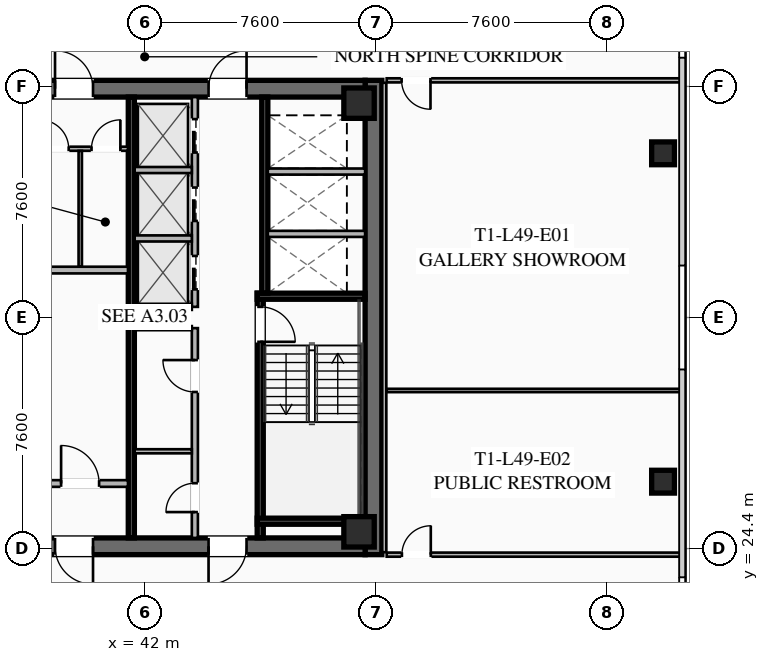
"""IFC4 building model, lengths in metres.
Left out: names, types, materials, properties, quantities, classifications, styles, units other than length and angle.
Written with IfcOpenShell. Run it as: python <this file> out.ifc"""

import sys

from ifc_helpers import new_model, si_unit, direction, frame, frame_2d, origin, origin_2d, place, context, subcontext, project, spatial, rectangle, hollow_rectangle, extrude, element, fill, save


model = new_model("IFC4")
c1 = context("Model", 3, precision=1e-05, world=origin(), true_north=direction((0.0, 1.0)))
c2 = subcontext(c1, "Body", "Model", "MODEL_VIEW")
j1 = project(units=[si_unit("LENGTHUNIT", "METRE"), si_unit("PLANEANGLEUNIT", "RADIAN")], contexts=[c1])
p1 = place(None, origin())
s1 = spatial("IfcSite", under=j1, at=p1, CompositionType="ELEMENT")
p2 = place(p1, origin())
s2 = spatial("IfcBuilding", under=s1, at=p2, CompositionType="ELEMENT")
p3 = place(p2, frame((0.0, 0.0, 181.85)))
s3 = spatial("IfcBuildingStorey", under=s2, at=p3, CompositionType="ELEMENT", Elevation=181.85)
p4 = place(p3, frame((49.525, 39.8, 0.0), z_axis=(0.0, 0.0, 1.0), x_axis=(0.0, -1.0, 0.0)))
e1 = element("IfcWall", 1, at=p4, inside=s3, PredefinedType="SHEAR", context=c2, shape_type="SweptSolid", body=[
    extrude(rectangle(XDim=15.6, YDim=0.55, at=frame_2d((7.8, 0.0))), origin(), (0.0, 0.0, 1.0), 3.55),
])
p5 = place(p3, frame((49.25, 24.475, 0.0), z_axis=(0.0, 0.0, 1.0), x_axis=(-1.0, 0.0, 0.0)))
e2 = element("IfcWall", 2, at=p5, inside=s3, PredefinedType="SHEAR", context=c2, shape_type="SweptSolid", body=[
    extrude(rectangle(XDim=14.5, YDim=0.55, at=frame_2d((7.25, 0.0))), origin(), (0.0, 0.0, 1.0), 3.55),
])
p6 = place(p5, frame((8.95, 0.0, 0.0)))
e3 = element("IfcOpeningElement", 3, at=p6, cuts=e2, PredefinedType="OPENING", context=c2, shape_type="SweptSolid", body=[
    extrude(rectangle(XDim=1.25, YDim=2.25, at=frame_2d((0.625, 1.125))), frame((0.0, 0.285, 0.0), z_axis=(0.0, -1.0, 0.0), x_axis=(1.0, 0.0, 0.0)), (0.0, 0.0, 1.0), 0.57),
])
p7 = place(p5, frame((3.9, 0.0, 0.0)))
e4 = element("IfcOpeningElement", 4, at=p7, cuts=e2, PredefinedType="OPENING", context=c2, shape_type="SweptSolid", body=[
    extrude(rectangle(XDim=1.25, YDim=2.25, at=frame_2d((0.625, 1.125))), frame((0.0, 0.285, 0.0), z_axis=(0.0, -1.0, 0.0), x_axis=(1.0, 0.0, 0.0)), (0.0, 0.0, 1.0), 0.57),
])
p8 = place(p3, frame((34.75, 39.525, 0.0), z_axis=(0.0, 0.0, 1.0), x_axis=(1.0, 0.0, 0.0)))
e5 = element("IfcWall", 5, at=p8, inside=s3, PredefinedType="SHEAR", context=c2, shape_type="SweptSolid", body=[
    extrude(rectangle(XDim=14.5, YDim=0.55, at=frame_2d((7.25, 0.0))), origin(), (0.0, 0.0, 1.0), 3.55),
])
p9 = place(p8, frame((4.3, 0.0, 0.0)))
e6 = element("IfcOpeningElement", 6, at=p9, cuts=e5, PredefinedType="OPENING", context=c2, shape_type="SweptSolid", body=[
    extrude(rectangle(XDim=1.25, YDim=2.25, at=frame_2d((0.625, 1.125))), frame((0.0, 0.285, 0.0), z_axis=(0.0, -1.0, 0.0), x_axis=(1.0, 0.0, 0.0)), (0.0, 0.0, 1.0), 0.57),
])
p10 = place(p8, frame((9.35, 0.0, 0.0)))
e7 = element("IfcOpeningElement", 7, at=p10, cuts=e5, PredefinedType="OPENING", context=c2, shape_type="SweptSolid", body=[
    extrude(rectangle(XDim=1.25, YDim=2.25, at=frame_2d((0.625, 1.125))), frame((0.0, 0.285, 0.0), z_axis=(0.0, -1.0, 0.0), x_axis=(1.0, 0.0, 0.0)), (0.0, 0.0, 1.0), 0.57),
])
for number, where, z_axis, x_axis in (
    (8, (49.05, 24.95, 0.0), (0.0, 0.0, 1.0), (1.0, 0.0, 0.0)),
    (9, (49.05, 39.05, 0.0), (0.0, 0.0, 1.0), (1.0, 0.0, 0.0)),
):
    element("IfcColumn", number, at=place(p3, frame(where, z_axis=z_axis, x_axis=x_axis)), inside=s3, PredefinedType="COLUMN", context=c2, shape_type="SweptSolid", body=[
        extrude(hollow_rectangle(XDim=1.0, YDim=1.0, WallThickness=0.04, at=origin_2d()), origin(), (0.0, 0.0, 1.0), 3.37),
    ])
for number, where, z_axis, x_axis in (
    (10, (59.05, 26.6, 0.0), (0.0, 0.0, 1.0), (1.0, 0.0, 0.0)),
    (11, (59.05, 37.4, 0.0), (0.0, 0.0, 1.0), (1.0, 0.0, 0.0)),
):
    element("IfcColumn", number, at=place(p3, frame(where, z_axis=z_axis, x_axis=x_axis)), inside=s3, PredefinedType="COLUMN", context=c2, shape_type="SweptSolid", body=[
        extrude(hollow_rectangle(XDim=0.75, YDim=0.75, WallThickness=0.032, at=origin_2d()), origin(), (0.0, 0.0, 1.0), 3.37),
    ])
p11 = place(p3, frame((45.8, 32.8, 0.0), z_axis=(0.0, 0.0, 1.0), x_axis=(0.0, -1.0, 0.0)))
e12 = element("IfcWall", 12, at=p11, inside=s3, PredefinedType="SHEAR", context=c2, shape_type="SweptSolid", body=[
    extrude(rectangle(XDim=8.05, YDim=0.2, at=frame_2d((4.025, 0.0))), origin(), (0.0, 0.0, 1.0), 3.37),
])
p12 = place(p11, frame((0.45, 0.0, 0.0)))
e13 = element("IfcOpeningElement", 13, at=p12, cuts=e12, PredefinedType="OPENING", context=c2, shape_type="SweptSolid", body=[
    extrude(rectangle(XDim=1.15, YDim=2.2, at=frame_2d((0.575, 1.1))), frame((0.0, 0.11, 0.0), z_axis=(0.0, -1.0, 0.0), x_axis=(1.0, 0.0, 0.0)), (0.0, 0.0, 1.0), 0.22),
])
for number, where, z_axis, x_axis in (
    (14, (45.7, 32.7, 0.0), (0.0, 0.0, 1.0), (1.0, 0.0, 0.0)),
    (15, (45.7, 25.3, 0.0), (0.0, 0.0, 1.0), (1.0, 0.0, 0.0)),
):
    element("IfcWall", number, at=place(p3, frame(where, z_axis=z_axis, x_axis=x_axis)), inside=s3, PredefinedType="SHEAR", context=c2, shape_type="SweptSolid", body=[
        extrude(rectangle(XDim=3.55, YDim=0.2, at=frame_2d((1.775, 0.0))), origin(), (0.0, 0.0, 1.0), 3.37),
    ])
p13 = place(p3, frame((41.56, 24.75, 0.0), z_axis=(0.0, 0.0, 1.0), x_axis=(0.0, 1.0, 0.0)))
e16 = element("IfcWall", 16, at=p13, inside=s3, PredefinedType="SHEAR", context=c2, shape_type="SweptSolid", body=[
    extrude(rectangle(XDim=14.5, YDim=0.2, at=frame_2d((7.25, 0.0))), origin(), (0.0, 0.0, 1.0), 3.37),
])
p14 = place(p3, frame((38.3, 33.56, 0.0), z_axis=(0.0, 0.0, 1.0), x_axis=(1.0, 0.0, 0.0)))
e17 = element("IfcWall", 17, at=p14, inside=s3, PredefinedType="SOLIDWALL", context=c2, shape_type="SweptSolid", body=[
    extrude(rectangle(XDim=3.15, YDim=0.22, at=frame_2d((1.575, 0.0))), origin(), (0.0, 0.0, 1.0), 2.723),
])
p15 = place(p3, frame((38.3, 26.54, 0.0), z_axis=(0.0, 0.0, 1.0), x_axis=(1.0, 0.0, 0.0)))
e18 = element("IfcWall", 18, at=p15, inside=s3, PredefinedType="SOLIDWALL", context=c2, shape_type="SweptSolid", body=[
    extrude(rectangle(XDim=3.15, YDim=0.22, at=frame_2d((1.575, 0.0))), origin(), (0.0, 0.0, 1.0), 2.723),
])
p16 = place(p15, frame((0.95, 0.0, 0.0)))
e19 = element("IfcOpeningElement", 19, at=p16, cuts=e18, PredefinedType="OPENING", context=c2, shape_type="SweptSolid", body=[
    extrude(rectangle(XDim=1.25, YDim=2.25, at=frame_2d((0.625, 1.125))), frame((0.0, 0.12, 0.0), z_axis=(0.0, -1.0, 0.0), x_axis=(1.0, 0.0, 0.0)), (0.0, 0.0, 1.0), 0.24),
])
p17 = place(p3, frame((45.95, 39.25, 0.0), z_axis=(0.0, 0.0, 1.0), x_axis=(0.0, -1.0, 0.0)))
e20 = element("IfcWall", 20, at=p17, inside=s3, PredefinedType="SHEAR", context=c2, shape_type="SweptSolid", body=[
    extrude(rectangle(XDim=6.45, YDim=0.2, at=frame_2d((3.225, 0.0))), origin(), (0.0, 0.0, 1.0), 3.37),
])
for number, where, z_axis, x_axis in (
    (21, (46.05, 34.75, 0.0), (0.0, 0.0, 1.0), (1.0, 0.0, 0.0)),
    (22, (46.05, 36.8, 0.0), (0.0, 0.0, 1.0), (1.0, 0.0, 0.0)),
):
    element("IfcWall", number, at=place(p3, frame(where, z_axis=z_axis, x_axis=x_axis)), inside=s3, PredefinedType="SOLIDWALL", context=c2, shape_type="SweptSolid", body=[
        extrude(rectangle(XDim=3.2, YDim=0.2, at=frame_2d((1.6, 0.0))), origin(), (0.0, 0.0, 1.0), 3.37),
    ])
p18 = place(p3, frame((38.3, 37.55, 0.0), z_axis=(0.0, 0.0, 1.0), x_axis=(1.0, 0.0, 0.0)))
e23 = element("IfcWall", 23, at=p18, inside=s3, PredefinedType="PARTITIONING", context=c2, shape_type="SweptSolid", body=[
    extrude(rectangle(XDim=3.15, YDim=0.135, at=frame_2d((1.575, 0.0))), origin(), (0.0, 0.0, 1.0), 2.723),
])
p19 = place(p18, frame((0.25, 0.0, 0.0)))
e24 = element("IfcOpeningElement", 24, at=p19, cuts=e23, PredefinedType="OPENING", context=c2, shape_type="SweptSolid", body=[
    extrude(rectangle(XDim=0.95, YDim=2.05, at=frame_2d((0.475, 1.025))), frame((0.0, 0.077, 0.0), z_axis=(0.0, -1.0, 0.0), x_axis=(1.0, 0.0, 0.0)), (0.0, 0.0, 1.0), 0.155),
])
p20 = place(p18, frame((1.95, 0.0, 0.0)))
e25 = element("IfcOpeningElement", 25, at=p20, cuts=e23, PredefinedType="OPENING", context=c2, shape_type="SweptSolid", body=[
    extrude(rectangle(XDim=0.95, YDim=2.05, at=frame_2d((0.475, 1.025))), frame((0.0, 0.077, 0.0), z_axis=(0.0, -1.0, 0.0), x_axis=(1.0, 0.0, 0.0)), (0.0, 0.0, 1.0), 0.155),
])
p21 = place(p3, frame((39.88, 33.68, 0.0), z_axis=(0.0, 0.0, 1.0), x_axis=(0.0, 1.0, 0.0)))
e26 = element("IfcWall", 26, at=p21, inside=s3, PredefinedType="PARTITIONING", context=c2, shape_type="SweptSolid", body=[
    extrude(rectangle(XDim=3.8, YDim=0.11, at=frame_2d((1.9, 0.0))), origin(), (0.0, 0.0, 1.0), 2.723),
])
p22 = place(p3, frame((43.65, 24.75, 0.0), z_axis=(0.0, 0.0, 1.0), x_axis=(0.0, 1.0, 0.0)))
e27 = element("IfcWall", 27, at=p22, inside=s3, PredefinedType="SOLIDWALL", context=c2, shape_type="SweptSolid", body=[
    extrude(rectangle(XDim=6.9, YDim=0.2, at=frame_2d((3.45, 0.0))), origin(), (0.0, 0.0, 1.0), 2.723),
])
p23 = place(p22, frame((0.85, 0.0, 0.0)))
e28 = element("IfcOpeningElement", 28, at=p23, cuts=e27, PredefinedType="OPENING", context=c2, shape_type="SweptSolid", body=[
    extrude(rectangle(XDim=0.95, YDim=2.05, at=frame_2d((0.475, 1.025))), frame((0.0, 0.11, 0.0), z_axis=(0.0, -1.0, 0.0), x_axis=(1.0, 0.0, 0.0)), (0.0, 0.0, 1.0), 0.22),
])
p24 = place(p22, frame((4.8, 0.0, 0.0)))
e29 = element("IfcOpeningElement", 29, at=p24, cuts=e27, PredefinedType="OPENING", context=c2, shape_type="SweptSolid", body=[
    extrude(rectangle(XDim=1.05, YDim=2.2, at=frame_2d((0.525, 1.1))), frame((0.0, 0.11, 0.0), z_axis=(0.0, -1.0, 0.0), x_axis=(1.0, 0.0, 0.0)), (0.0, 0.0, 1.0), 0.22),
])
for number, where, z_axis, x_axis in (
    (30, (41.67, 31.65, 0.0), (0.0, 0.0, 1.0), (1.0, 0.0, 0.0)),
    (31, (41.67, 27.6, 0.0), (0.0, 0.0, 1.0), (1.0, 0.0, 0.0)),
):
    element("IfcWall", number, at=place(p3, frame(where, z_axis=z_axis, x_axis=x_axis)), inside=s3, PredefinedType="PARTITIONING", context=c2, shape_type="SweptSolid", body=[
        extrude(rectangle(XDim=1.88, YDim=0.135, at=frame_2d((0.94, 0.0))), origin(), (0.0, 0.0, 1.0), 2.723),
    ])
p25 = place(p3, frame((43.65, 32.35, 0.0), z_axis=(0.0, 0.0, 1.0), x_axis=(0.0, 1.0, 0.0)))
e32 = element("IfcWall", 32, at=p25, inside=s3, PredefinedType="SOLIDWALL", context=c2, shape_type="SweptSolid", body=[
    extrude(rectangle(XDim=6.9, YDim=0.2, at=frame_2d((3.45, 0.0))), origin(), (0.0, 0.0, 1.0), 3.37),
])
p26 = place(p25, frame((0.575, 0.0, 0.0)))
e33 = element("IfcOpeningElement", 33, at=p26, cuts=e32, PredefinedType="OPENING", context=c2, shape_type="SweptSolid", body=[
    extrude(rectangle(XDim=1.1, YDim=2.2, at=frame_2d((0.55, 1.1))), frame((0.0, 0.11, 0.0), z_axis=(0.0, -1.0, 0.0), x_axis=(1.0, 0.0, 0.0)), (0.0, 0.0, 1.0), 0.22),
])
p27 = place(p25, frame((2.825, 0.0, 0.0)))
e34 = element("IfcOpeningElement", 34, at=p27, cuts=e32, PredefinedType="OPENING", context=c2, shape_type="SweptSolid", body=[
    extrude(rectangle(XDim=1.1, YDim=2.2, at=frame_2d((0.55, 1.1))), frame((0.0, 0.11, 0.0), z_axis=(0.0, -1.0, 0.0), x_axis=(1.0, 0.0, 0.0)), (0.0, 0.0, 1.0), 0.22),
])
p28 = place(p25, frame((5.075, 0.0, 0.0)))
e35 = element("IfcOpeningElement", 35, at=p28, cuts=e32, PredefinedType="OPENING", context=c2, shape_type="SweptSolid", body=[
    extrude(rectangle(XDim=1.1, YDim=2.2, at=frame_2d((0.55, 1.1))), frame((0.0, 0.11, 0.0), z_axis=(0.0, -1.0, 0.0), x_axis=(1.0, 0.0, 0.0)), (0.0, 0.0, 1.0), 0.22),
])
for number, where, z_axis, x_axis in (
    (36, (41.67, 32.35, 0.0), (0.0, 0.0, 1.0), (1.0, 0.0, 0.0)),
    (37, (41.67, 34.6, 0.0), (0.0, 0.0, 1.0), (1.0, 0.0, 0.0)),
    (38, (41.67, 36.85, 0.0), (0.0, 0.0, 1.0), (1.0, 0.0, 0.0)),
):
    element("IfcWall", number, at=place(p3, frame(where, z_axis=z_axis, x_axis=x_axis)), inside=s3, PredefinedType="SOLIDWALL", context=c2, shape_type="SweptSolid", body=[
        extrude(rectangle(XDim=1.88, YDim=0.2, at=frame_2d((0.94, 0.0))), origin(), (0.0, 0.0, 1.0), 3.37),
    ])
p29 = place(p3, frame((49.88, 39.72, 0.0), z_axis=(0.0, 0.0, 1.0), x_axis=(0.0, -1.0, 0.0)))
e39 = element("IfcWall", 39, at=p29, inside=s3, PredefinedType="PARTITIONING", context=c2, shape_type="SweptSolid", body=[
    extrude(rectangle(XDim=15.44, YDim=0.135, at=frame_2d((7.72, 0.0))), origin(), (0.0, 0.0, 1.0), 2.723),
])
p30 = place(p3, frame((59.68, 39.8, 0.0), z_axis=(0.0, 0.0, 1.0), x_axis=(-1.0, 0.0, 0.0)))
e40 = element("IfcWall", 40, at=p30, inside=s3, PredefinedType="PARTITIONING", context=c2, shape_type="SweptSolid", body=[
    extrude(rectangle(XDim=9.72, YDim=0.135, at=frame_2d((4.86, 0.0))), origin(), (0.0, 0.0, 1.0), 2.723),
])
p31 = place(p30, frame((8.28, 0.0, 0.0)))
e41 = element("IfcOpeningElement", 41, at=p31, cuts=e40, PredefinedType="OPENING", context=c2, shape_type="SweptSolid", body=[
    extrude(rectangle(XDim=0.95, YDim=2.05, at=frame_2d((0.475, 1.025))), frame((0.0, 0.077, 0.0), z_axis=(0.0, -1.0, 0.0), x_axis=(1.0, 0.0, 0.0)), (0.0, 0.0, 1.0), 0.155),
])
p32 = place(p3, frame((49.96, 24.2, 0.0), z_axis=(0.0, 0.0, 1.0), x_axis=(1.0, 0.0, 0.0)))
e42 = element("IfcWall", 42, at=p32, inside=s3, PredefinedType="PARTITIONING", context=c2, shape_type="SweptSolid", body=[
    extrude(rectangle(XDim=9.72, YDim=0.135, at=frame_2d((4.86, 0.0))), origin(), (0.0, 0.0, 1.0), 2.723),
])
p33 = place(p32, frame((0.5, 0.0, 0.0)))
e43 = element("IfcOpeningElement", 43, at=p33, cuts=e42, PredefinedType="OPENING", context=c2, shape_type="SweptSolid", body=[
    extrude(rectangle(XDim=0.95, YDim=2.05, at=frame_2d((0.475, 1.025))), frame((0.0, 0.077, 0.0), z_axis=(0.0, -1.0, 0.0), x_axis=(1.0, 0.0, 0.0)), (0.0, 0.0, 1.0), 0.155),
])
p34 = place(p3, frame((49.96, 29.6, 0.0), z_axis=(0.0, 0.0, 1.0), x_axis=(1.0, 0.0, 0.0)))
e44 = element("IfcWall", 44, at=p34, inside=s3, PredefinedType="PARTITIONING", context=c2, shape_type="SweptSolid", body=[
    extrude(rectangle(XDim=9.72, YDim=0.11, at=frame_2d((4.86, 0.0))), origin(), (0.0, 0.0, 1.0), 2.723),
])
p35 = place(p9, origin())
e45 = element("IfcDoor", 45, at=p35, inside=s3, OperationType="SINGLE_SWING_LEFT", PredefinedType="DOOR", context=c2, shape_type="SweptSolid", body=[
    extrude(rectangle(XDim=1.25, YDim=2.25, at=frame_2d((0.625, 1.125))), frame((0.0, 0.025, 0.0), z_axis=(0.0, -1.0, 0.0), x_axis=(1.0, 0.0, 0.0)), (0.0, 0.0, 1.0), 0.05),
])
fill(e6, e45)
p36 = place(p10, origin())
e46 = element("IfcDoor", 46, at=p36, inside=s3, OperationType="SINGLE_SWING_RIGHT", PredefinedType="DOOR", context=c2, shape_type="SweptSolid", body=[
    extrude(rectangle(XDim=1.25, YDim=2.25, at=frame_2d((0.625, 1.125))), frame((0.0, 0.025, 0.0), z_axis=(0.0, -1.0, 0.0), x_axis=(1.0, 0.0, 0.0)), (0.0, 0.0, 1.0), 0.05),
])
fill(e7, e46)
p37 = place(p6, origin())
e47 = element("IfcDoor", 47, at=p37, inside=s3, OperationType="SINGLE_SWING_LEFT", PredefinedType="DOOR", context=c2, shape_type="SweptSolid", body=[
    extrude(rectangle(XDim=1.25, YDim=2.25, at=frame_2d((0.625, 1.125))), frame((0.0, 0.025, 0.0), z_axis=(0.0, -1.0, 0.0), x_axis=(1.0, 0.0, 0.0)), (0.0, 0.0, 1.0), 0.05),
])
fill(e3, e47)
p38 = place(p7, origin())
e48 = element("IfcDoor", 48, at=p38, inside=s3, OperationType="SINGLE_SWING_RIGHT", PredefinedType="DOOR", context=c2, shape_type="SweptSolid", body=[
    extrude(rectangle(XDim=1.25, YDim=2.25, at=frame_2d((0.625, 1.125))), frame((0.0, 0.025, 0.0), z_axis=(0.0, -1.0, 0.0), x_axis=(1.0, 0.0, 0.0)), (0.0, 0.0, 1.0), 0.05),
])
fill(e4, e48)
p39 = place(p12, origin())
e49 = element("IfcDoor", 49, at=p39, inside=s3, OperationType="SINGLE_SWING_RIGHT", PredefinedType="DOOR", context=c2, shape_type="SweptSolid", body=[
    extrude(rectangle(XDim=1.15, YDim=2.2, at=frame_2d((0.575, 1.1))), frame((0.0, 0.025, 0.0), z_axis=(0.0, -1.0, 0.0), x_axis=(1.0, 0.0, 0.0)), (0.0, 0.0, 1.0), 0.05),
])
fill(e13, e49)
p40 = place(p16, origin())
e50 = element("IfcDoor", 50, at=p40, inside=s3, OperationType="SINGLE_SWING_LEFT", PredefinedType="DOOR", context=c2, shape_type="SweptSolid", body=[
    extrude(rectangle(XDim=1.25, YDim=2.25, at=frame_2d((0.625, 1.125))), frame((0.0, 0.025, 0.0), z_axis=(0.0, -1.0, 0.0), x_axis=(1.0, 0.0, 0.0)), (0.0, 0.0, 1.0), 0.05),
])
fill(e19, e50)
p41 = place(p19, origin())
e51 = element("IfcDoor", 51, at=p41, inside=s3, OperationType="SINGLE_SWING_LEFT", PredefinedType="DOOR", context=c2, shape_type="SweptSolid", body=[
    extrude(rectangle(XDim=0.95, YDim=2.05, at=frame_2d((0.475, 1.025))), frame((0.0, 0.025, 0.0), z_axis=(0.0, -1.0, 0.0), x_axis=(1.0, 0.0, 0.0)), (0.0, 0.0, 1.0), 0.05),
])
fill(e24, e51)
p42 = place(p20, origin())
e52 = element("IfcDoor", 52, at=p42, inside=s3, OperationType="SINGLE_SWING_RIGHT", PredefinedType="DOOR", context=c2, shape_type="SweptSolid", body=[
    extrude(rectangle(XDim=0.95, YDim=2.05, at=frame_2d((0.475, 1.025))), frame((0.0, 0.025, 0.0), z_axis=(0.0, -1.0, 0.0), x_axis=(1.0, 0.0, 0.0)), (0.0, 0.0, 1.0), 0.05),
])
fill(e25, e52)
p43 = place(p23, origin())
e53 = element("IfcDoor", 53, at=p43, inside=s3, OperationType="SINGLE_SWING_LEFT", PredefinedType="DOOR", context=c2, shape_type="SweptSolid", body=[
    extrude(rectangle(XDim=0.95, YDim=2.05, at=frame_2d((0.475, 1.025))), frame((0.0, 0.025, 0.0), z_axis=(0.0, -1.0, 0.0), x_axis=(1.0, 0.0, 0.0)), (0.0, 0.0, 1.0), 0.05),
])
fill(e28, e53)
p44 = place(p24, origin())
e54 = element("IfcDoor", 54, at=p44, inside=s3, OperationType="SINGLE_SWING_RIGHT", PredefinedType="DOOR", context=c2, shape_type="SweptSolid", body=[
    extrude(rectangle(XDim=1.05, YDim=2.2, at=frame_2d((0.525, 1.1))), frame((0.0, 0.025, 0.0), z_axis=(0.0, -1.0, 0.0), x_axis=(1.0, 0.0, 0.0)), (0.0, 0.0, 1.0), 0.05),
])
fill(e29, e54)
p45 = place(p31, origin())
e55 = element("IfcDoor", 55, at=p45, inside=s3, OperationType="SINGLE_SWING_LEFT", PredefinedType="DOOR", context=c2, shape_type="SweptSolid", body=[
    extrude(rectangle(XDim=0.95, YDim=2.05, at=frame_2d((0.475, 1.025))), frame((0.0, 0.025, 0.0), z_axis=(0.0, -1.0, 0.0), x_axis=(1.0, 0.0, 0.0)), (0.0, 0.0, 1.0), 0.05),
])
fill(e41, e55)
p46 = place(p33, origin())
e56 = element("IfcDoor", 56, at=p46, inside=s3, OperationType="SINGLE_SWING_RIGHT", PredefinedType="DOOR", context=c2, shape_type="SweptSolid", body=[
    extrude(rectangle(XDim=0.95, YDim=2.05, at=frame_2d((0.475, 1.025))), frame((0.0, 0.025, 0.0), z_axis=(0.0, -1.0, 0.0), x_axis=(1.0, 0.0, 0.0)), (0.0, 0.0, 1.0), 0.05),
])
fill(e43, e56)
p47 = place(p26, origin())
e57 = element("IfcDoor", 57, at=p47, inside=s3, OperationType="SLIDING_TO_LEFT", PredefinedType="DOOR", context=c2, shape_type="SweptSolid", body=[
    extrude(rectangle(XDim=1.1, YDim=2.2, at=frame_2d((0.55, 1.1))), frame((0.0, 0.025, 0.0), z_axis=(0.0, -1.0, 0.0), x_axis=(1.0, 0.0, 0.0)), (0.0, 0.0, 1.0), 0.05),
])
fill(e33, e57)
p48 = place(p27, origin())
e58 = element("IfcDoor", 58, at=p48, inside=s3, OperationType="SLIDING_TO_LEFT", PredefinedType="DOOR", context=c2, shape_type="SweptSolid", body=[
    extrude(rectangle(XDim=1.1, YDim=2.2, at=frame_2d((0.55, 1.1))), frame((0.0, 0.025, 0.0), z_axis=(0.0, -1.0, 0.0), x_axis=(1.0, 0.0, 0.0)), (0.0, 0.0, 1.0), 0.05),
])
fill(e34, e58)
p49 = place(p28, origin())
e59 = element("IfcDoor", 59, at=p49, inside=s3, OperationType="SLIDING_TO_LEFT", PredefinedType="DOOR", context=c2, shape_type="SweptSolid", body=[
    extrude(rectangle(XDim=1.1, YDim=2.2, at=frame_2d((0.55, 1.1))), frame((0.0, 0.025, 0.0), z_axis=(0.0, -1.0, 0.0), x_axis=(1.0, 0.0, 0.0)), (0.0, 0.0, 1.0), 0.05),
])
fill(e35, e59)
save(model, sys.argv[1])
